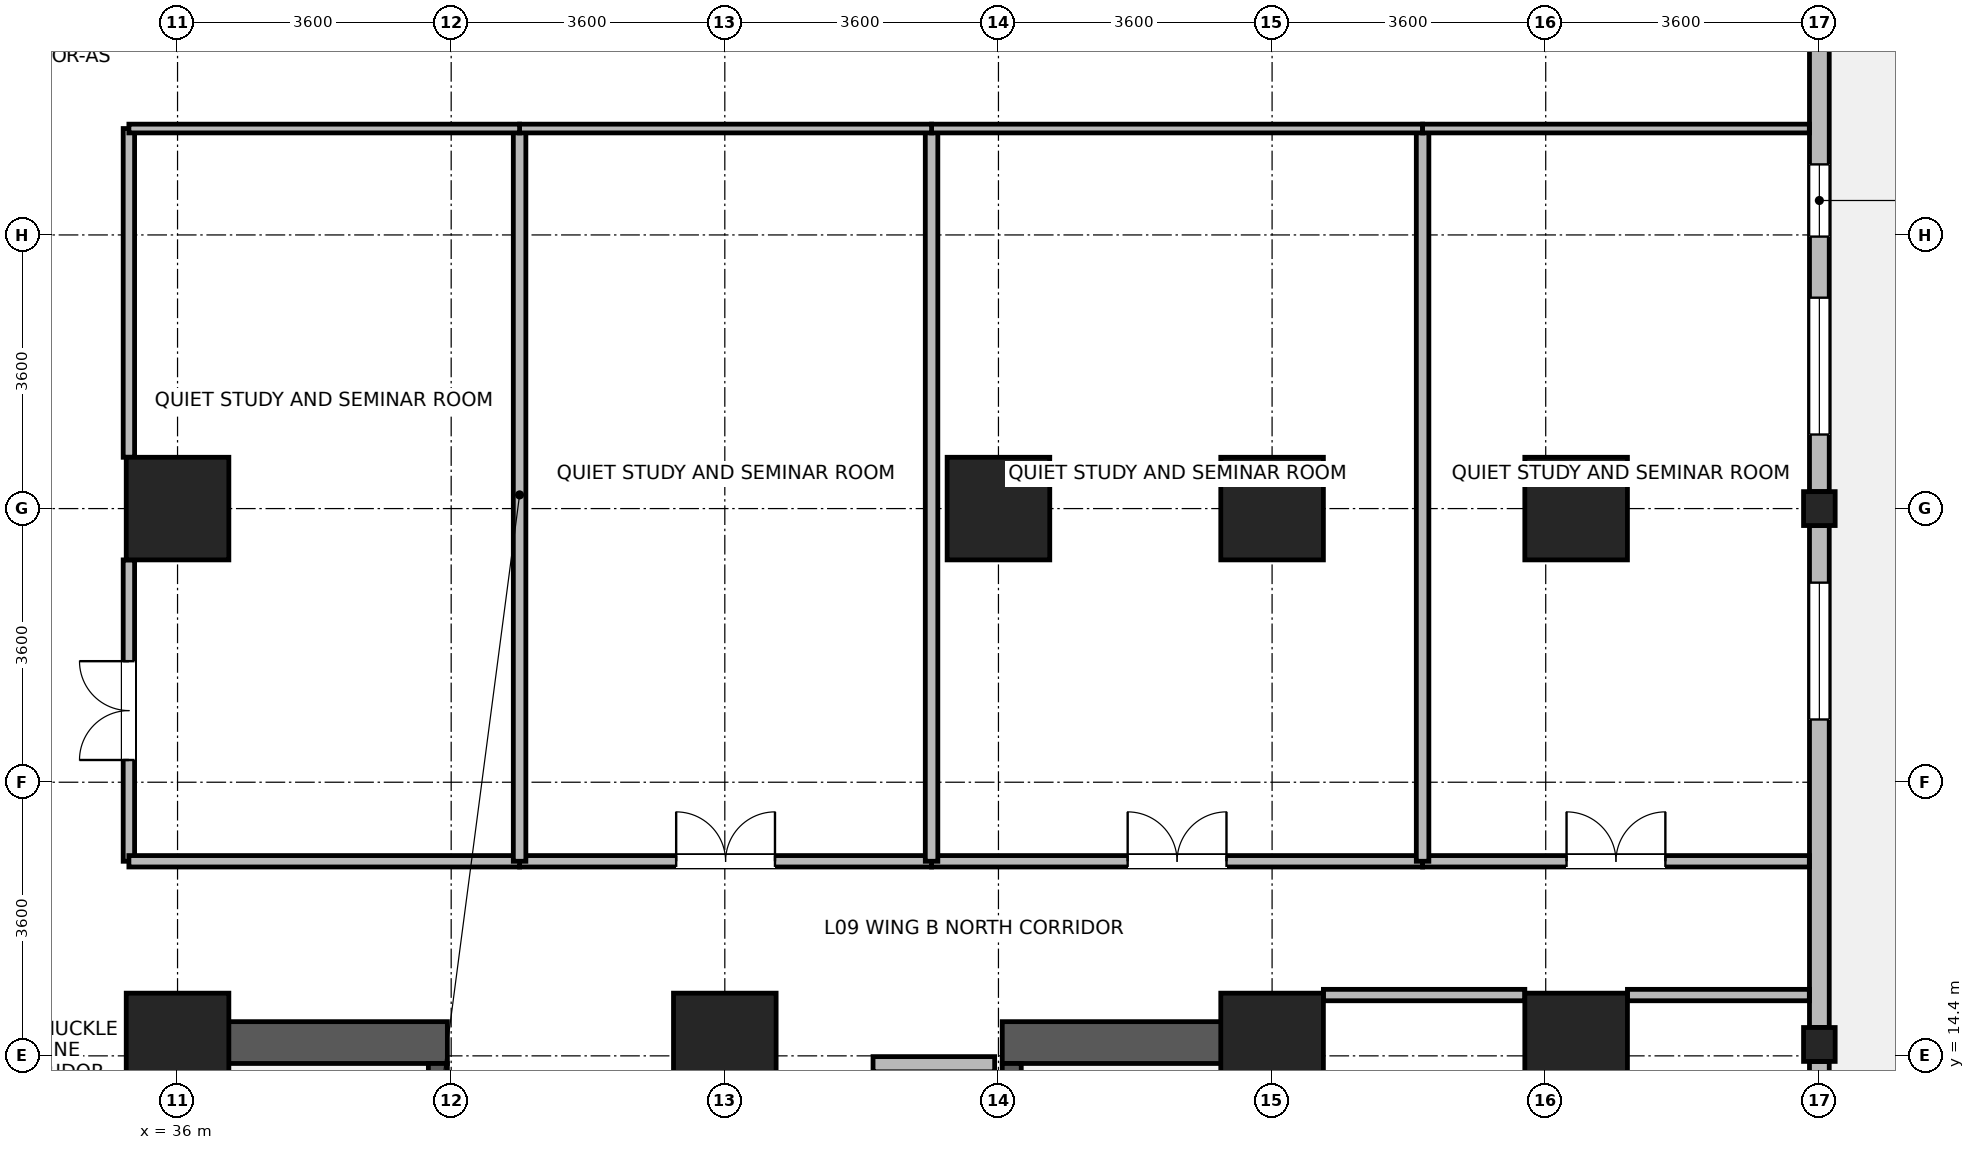
"""IFC4 building model, lengths in metres.
Left out: names, types, materials, properties, quantities, classifications, styles, units other than length and angle.
Written with IfcOpenShell. Run it as: python <this file> out.ifc"""

import sys

from ifc_helpers import new_model, si_unit, direction, frame, frame_2d, origin, origin_2d, place, context, subcontext, project, spatial, rectangle, i_section, extrude, source, transform, mapped, element, fill, save


model = new_model("IFC4")
c1 = context("Model", 3, precision=1e-05, world=origin(), true_north=direction((0.0, 1.0)))
c2 = subcontext(c1, "Body", "Model", "MODEL_VIEW")
j1 = project(units=[si_unit("LENGTHUNIT", "METRE"), si_unit("PLANEANGLEUNIT", "RADIAN")], contexts=[c1])
p1 = place(None, origin())
s1 = spatial("IfcSite", under=j1, at=p1, CompositionType="ELEMENT")
p2 = place(p1, origin())
s2 = spatial("IfcBuilding", under=s1, at=p2, CompositionType="ELEMENT")
p3 = place(p2, frame((0.0, 0.0, 40.1)))
s3 = spatial("IfcBuildingStorey", under=s2, at=p3, CompositionType="ELEMENT", Elevation=40.1)
for number, where, z_axis, x_axis in (
    (1, (36.075, 6.75, 0.0), (0.0, 0.0, 1.0), (0.0, 1.0, 0.0)),
    (2, (50.325, 6.75, 0.0), (0.0, 0.0, 1.0), (0.0, 1.0, 0.0)),
):
    element("IfcWall", number, at=place(p3, frame(where, z_axis=z_axis, x_axis=x_axis)), inside=s3, PredefinedType="SHEAR", context=c2, shape_type="SweptSolid", body=[
        extrude(rectangle(XDim=8.1, YDim=0.55, at=frame_2d((4.05, 0.0))), origin(), (0.0, 0.0, 1.0), 3.45),
    ])
for number, where, z_axis, x_axis in (
    (3, (36.35, 14.575, 0.0), (0.0, 0.0, 1.0), (1.0, 0.0, 0.0)),
    (4, (46.85, 14.575, 0.0), (0.0, 0.0, 1.0), (1.0, 0.0, 0.0)),
):
    element("IfcWall", number, at=place(p3, frame(where, z_axis=z_axis, x_axis=x_axis)), inside=s3, PredefinedType="SHEAR", context=c2, shape_type="SweptSolid", body=[
        extrude(rectangle(XDim=3.2, YDim=0.55, at=frame_2d((1.6, 0.0))), origin(), (0.0, 0.0, 1.0), 3.45),
    ])
p4 = place(p3, frame((39.425, 7.3, 0.0), z_axis=(0.0, 0.0, 1.0), x_axis=(0.0, 1.0, 0.0)))
e5 = element("IfcWall", 5, at=p4, inside=s3, PredefinedType="SHEAR", context=c2, shape_type="SweptSolid", body=[
    extrude(rectangle(XDim=7.0, YDim=0.25, at=frame_2d((3.5, 0.0))), origin(), (0.0, 0.0, 1.0), 3.45),
])
p5 = place(p4, frame((0.15, 0.0, 0.0)))
e6 = element("IfcOpeningElement", 6, at=p5, cuts=e5, PredefinedType="OPENING", context=c2, shape_type="SweptSolid", body=[
    extrude(rectangle(XDim=1.1, YDim=2.08, at=frame_2d((0.55, 1.04))), frame((0.0, 0.135, 0.0), z_axis=(0.0, -1.0, 0.0), x_axis=(1.0, 0.0, 0.0)), (0.0, 0.0, 1.0), 0.27),
])
p6 = place(p3, frame((46.975, 7.3, 0.0), z_axis=(0.0, 0.0, 1.0), x_axis=(0.0, 1.0, 0.0)))
e7 = element("IfcWall", 7, at=p6, inside=s3, PredefinedType="SHEAR", context=c2, shape_type="SweptSolid", body=[
    extrude(rectangle(XDim=7.0, YDim=0.25, at=frame_2d((3.5, 0.0))), origin(), (0.0, 0.0, 1.0), 3.45),
])
p7 = place(p6, frame((0.15, 0.0, 0.0)))
e8 = element("IfcOpeningElement", 8, at=p7, cuts=e7, PredefinedType="OPENING", context=c2, shape_type="SweptSolid", body=[
    extrude(rectangle(XDim=1.1, YDim=2.08, at=frame_2d((0.55, 1.04))), frame((0.0, 0.135, 0.0), z_axis=(0.0, -1.0, 0.0), x_axis=(1.0, 0.0, 0.0)), (0.0, 0.0, 1.0), 0.27),
])
m1 = source(origin(), c2, "Body", "SweptSolid", [
    extrude(rectangle(XDim=1.35, YDim=1.35, at=origin_2d()), origin(), (0.0, 0.0, 1.0), 3.7),
])
for number, where, z_axis, x_axis in (
    (9, (36.0, 21.6, 0.0), (0.0, 0.0, 1.0), (1.0, 0.0, 0.0)),
    (10, (46.8, 21.6, 0.0), (0.0, 0.0, 1.0), (1.0, 0.0, 0.0)),
    (11, (36.0, 14.55, 0.0), (0.0, 0.0, 1.0), (1.0, 0.0, 0.0)),
    (12, (43.2, 14.55, 0.0), (0.0, 0.0, 1.0), (1.0, 0.0, 0.0)),
    (13, (50.4, 14.55, 0.0), (0.0, 0.0, 1.0), (1.0, 0.0, 0.0)),
    (14, (50.4, 21.6, 0.0), (0.0, 0.0, 1.0), (1.0, 0.0, 0.0)),
    (15, (54.4, 14.55, 0.0), (0.0, 0.0, 1.0), (1.0, 0.0, 0.0)),
    (16, (54.4, 21.6, 0.0), (0.0, 0.0, 1.0), (1.0, 0.0, 0.0)),
):
    element("IfcColumn", number, at=place(p3, frame(where, z_axis=z_axis, x_axis=x_axis)), inside=s3, PredefinedType="COLUMN", context=c2, shape_type="MappedRepresentation", body=[
        mapped(m1, transform((0.0, 0.0, 0.0), x_axis=(1.0, 0.0, 0.0), y_axis=(0.0, 1.0, 0.0), z_axis=(0.0, 0.0, 1.0), scale=1.0)),
    ])
m2 = source(origin(), c2, "Body", "SweptSolid", [
    extrude(i_section(OverallWidth=0.416, OverallDepth=0.446, WebThickness=0.029, FlangeThickness=0.04, FilletRadius=0.015, at=origin_2d()), origin(), (0.0, 0.0, 1.0), 3.7),
])
for number, where, z_axis, x_axis in (
    (17, (57.6, 14.55, 0.0), (0.0, 0.0, 1.0), (1.0, 0.0, 0.0)),
    (18, (57.6, 21.6, 0.0), (0.0, 0.0, 1.0), (1.0, 0.0, 0.0)),
):
    element("IfcColumn", number, at=place(p3, frame(where, z_axis=z_axis, x_axis=x_axis)), inside=s3, PredefinedType="COLUMN", context=c2, shape_type="MappedRepresentation", body=[
        mapped(m2, transform((0.0, 0.0, 0.0), x_axis=(1.0, 0.0, 0.0), y_axis=(0.0, 1.0, 0.0), z_axis=(0.0, 0.0, 1.0), scale=1.0)),
    ])
p8 = place(p3, frame((57.6, 14.326, 0.0), z_axis=(0.0, 0.0, 1.0), x_axis=(0.0, -1.0, 0.0)))
e19 = element("IfcWall", 19, at=p8, inside=s3, PredefinedType="STANDARD", context=c2, shape_type="SweptSolid", body=[
    extrude(rectangle(XDim=7.052, YDim=0.26, at=frame_2d((3.526, 0.0))), origin(), (0.0, 0.0, 1.0), 2.93),
])
p9 = place(p8, frame((0.863, 0.0, 0.85)))
e20 = element("IfcOpeningElement", 20, at=p9, cuts=e19, PredefinedType="OPENING", context=c2, shape_type="SweptSolid", body=[
    extrude(rectangle(XDim=1.8, YDim=1.85, at=frame_2d((0.9, 0.925))), frame((0.0, 0.14, 0.0), z_axis=(0.0, -1.0, 0.0), x_axis=(1.0, 0.0, 0.0)), (0.0, 0.0, 1.0), 0.28),
])
p10 = place(p8, frame((4.389, 0.0, 0.85)))
e21 = element("IfcOpeningElement", 21, at=p10, cuts=e19, PredefinedType="OPENING", context=c2, shape_type="SweptSolid", body=[
    extrude(rectangle(XDim=1.8, YDim=1.85, at=frame_2d((0.9, 0.925))), frame((0.0, 0.14, 0.0), z_axis=(0.0, -1.0, 0.0), x_axis=(1.0, 0.0, 0.0)), (0.0, 0.0, 1.0), 0.28),
])
p11 = place(p3, frame((57.6, 21.376, 0.0), z_axis=(0.0, 0.0, 1.0), x_axis=(0.0, -1.0, 0.0)))
e22 = element("IfcWall", 22, at=p11, inside=s3, PredefinedType="STANDARD", context=c2, shape_type="SweptSolid", body=[
    extrude(rectangle(XDim=6.602, YDim=0.26, at=frame_2d((3.301, 0.0))), origin(), (0.0, 0.0, 1.0), 2.93),
])
p12 = place(p11, frame((0.75, 0.0, 0.85)))
e23 = element("IfcOpeningElement", 23, at=p12, cuts=e22, PredefinedType="OPENING", context=c2, shape_type="SweptSolid", body=[
    extrude(rectangle(XDim=1.8, YDim=1.85, at=frame_2d((0.9, 0.925))), frame((0.0, 0.14, 0.0), z_axis=(0.0, -1.0, 0.0), x_axis=(1.0, 0.0, 0.0)), (0.0, 0.0, 1.0), 0.28),
])
p13 = place(p3, frame((57.6, 28.426, 0.0), z_axis=(0.0, 0.0, 1.0), x_axis=(0.0, -1.0, 0.0)))
e24 = element("IfcWall", 24, at=p13, inside=s3, PredefinedType="STANDARD", context=c2, shape_type="SweptSolid", body=[
    extrude(rectangle(XDim=6.602, YDim=0.26, at=frame_2d((3.301, 0.0))), origin(), (0.0, 0.0, 1.0), 2.93),
])
p14 = place(p13, frame((4.052, 0.0, 0.85)))
e25 = element("IfcOpeningElement", 25, at=p14, cuts=e24, PredefinedType="OPENING", context=c2, shape_type="SweptSolid", body=[
    extrude(rectangle(XDim=1.8, YDim=1.85, at=frame_2d((0.9, 0.925))), frame((0.0, 0.14, 0.0), z_axis=(0.0, -1.0, 0.0), x_axis=(1.0, 0.0, 0.0)), (0.0, 0.0, 1.0), 0.28),
])
p15 = place(p13, frame((2.298, 0.0, 0.85)))
e26 = element("IfcOpeningElement", 26, at=p15, cuts=e24, PredefinedType="OPENING", context=c2, shape_type="SweptSolid", body=[
    extrude(rectangle(XDim=0.95, YDim=1.75, at=frame_2d((0.475, 0.875))), frame((0.0, 0.14, 0.0), z_axis=(0.0, -1.0, 0.0), x_axis=(1.0, 0.0, 0.0)), (0.0, 0.0, 1.0), 0.28),
])
p16 = place(p3, frame((45.15, 14.29, 0.0), z_axis=(0.0, 0.0, 1.0), x_axis=(1.0, 0.0, 0.0)))
e27 = element("IfcWall", 27, at=p16, inside=s3, PredefinedType="PARTITIONING", context=c2, shape_type="SweptSolid", body=[
    extrude(rectangle(XDim=1.6, YDim=0.2, at=frame_2d((0.8, 0.0))), origin(), (0.0, 0.0, 1.0), 2.23),
])
p17 = place(p3, frame((35.36, 16.96, 0.0), z_axis=(0.0, 0.0, 1.0), x_axis=(0.0, 1.0, 0.0)))
e28 = element("IfcWall", 28, at=p17, inside=s3, PredefinedType="PARTITIONING", context=c2, shape_type="SweptSolid", body=[
    extrude(rectangle(XDim=3.965, YDim=0.15, at=frame_2d((1.982, 0.0))), origin(), (0.0, 0.0, 1.0), 3.43),
])
p18 = place(p17, frame((1.333, 0.0, 0.0)))
e29 = element("IfcOpeningElement", 29, at=p18, cuts=e28, PredefinedType="OPENING", context=c2, shape_type="SweptSolid", body=[
    extrude(rectangle(XDim=1.3, YDim=2.12, at=frame_2d((0.65, 1.06))), frame((0.0, 0.085, 0.0), z_axis=(0.0, -1.0, 0.0), x_axis=(1.0, 0.0, 0.0)), (0.0, 0.0, 1.0), 0.17),
])
p19 = place(p3, frame((35.36, 22.275, 0.0), z_axis=(0.0, 0.0, 1.0), x_axis=(0.0, 1.0, 0.0)))
e30 = element("IfcWall", 30, at=p19, inside=s3, PredefinedType="PARTITIONING", context=c2, shape_type="SweptSolid", body=[
    extrude(rectangle(XDim=4.325, YDim=0.15, at=frame_2d((2.163, 0.0))), origin(), (0.0, 0.0, 1.0), 3.43),
])
p20 = place(p3, frame((51.075, 15.2, 0.0), z_axis=(0.0, 0.0, 1.0), x_axis=(1.0, 0.0, 0.0)))
e31 = element("IfcWall", 31, at=p20, inside=s3, PredefinedType="PARTITIONING", context=c2, shape_type="SweptSolid", body=[
    extrude(rectangle(XDim=2.65, YDim=0.15, at=frame_2d((1.325, 0.0))), origin(), (0.0, 0.0, 1.0), 3.43),
])
p21 = place(p3, frame((55.075, 15.2, 0.0), z_axis=(0.0, 0.0, 1.0), x_axis=(1.0, 0.0, 0.0)))
e32 = element("IfcWall", 32, at=p21, inside=s3, PredefinedType="PARTITIONING", context=c2, shape_type="SweptSolid", body=[
    extrude(rectangle(XDim=2.393, YDim=0.15, at=frame_2d((1.197, 0.0))), origin(), (0.0, 0.0, 1.0), 3.43),
])
p22 = place(p3, frame((45.92, 16.96, 0.0), z_axis=(0.0, 0.0, 1.0), x_axis=(1.0, 0.0, 0.0)))
e33 = element("IfcWall", 33, at=p22, inside=s3, PredefinedType="PARTITIONING", context=c2, shape_type="SweptSolid", body=[
    extrude(rectangle(XDim=6.46, YDim=0.15, at=frame_2d((3.23, 0.0))), origin(), (0.0, 0.0, 1.0), 3.43),
])
p23 = place(p22, frame((2.58, 0.0, 0.0)))
e34 = element("IfcOpeningElement", 34, at=p23, cuts=e33, PredefinedType="OPENING", context=c2, shape_type="SweptSolid", body=[
    extrude(rectangle(XDim=1.3, YDim=2.12, at=frame_2d((0.65, 1.06))), frame((0.0, 0.085, 0.0), z_axis=(0.0, -1.0, 0.0), x_axis=(1.0, 0.0, 0.0)), (0.0, 0.0, 1.0), 0.17),
])
p24 = place(p3, frame((40.5, 16.96, 0.0), z_axis=(0.0, 0.0, 1.0), x_axis=(1.0, 0.0, 0.0)))
e35 = element("IfcWall", 35, at=p24, inside=s3, PredefinedType="PARTITIONING", context=c2, shape_type="SweptSolid", body=[
    extrude(rectangle(XDim=5.42, YDim=0.15, at=frame_2d((2.71, 0.0))), origin(), (0.0, 0.0, 1.0), 3.43),
])
p25 = place(p24, frame((2.06, 0.0, 0.0)))
e36 = element("IfcOpeningElement", 36, at=p25, cuts=e35, PredefinedType="OPENING", context=c2, shape_type="SweptSolid", body=[
    extrude(rectangle(XDim=1.3, YDim=2.12, at=frame_2d((0.65, 1.06))), frame((0.0, 0.085, 0.0), z_axis=(0.0, -1.0, 0.0), x_axis=(1.0, 0.0, 0.0)), (0.0, 0.0, 1.0), 0.17),
])
p26 = place(p3, frame((52.38, 16.96, 0.0), z_axis=(0.0, 0.0, 1.0), x_axis=(1.0, 0.0, 0.0)))
e37 = element("IfcWall", 37, at=p26, inside=s3, PredefinedType="PARTITIONING", context=c2, shape_type="SweptSolid", body=[
    extrude(rectangle(XDim=5.088, YDim=0.15, at=frame_2d((2.544, 0.0))), origin(), (0.0, 0.0, 1.0), 3.43),
])
p27 = place(p26, frame((1.894, 0.0, 0.0)))
e38 = element("IfcOpeningElement", 38, at=p27, cuts=e37, PredefinedType="OPENING", context=c2, shape_type="SweptSolid", body=[
    extrude(rectangle(XDim=1.3, YDim=2.12, at=frame_2d((0.65, 1.06))), frame((0.0, 0.085, 0.0), z_axis=(0.0, -1.0, 0.0), x_axis=(1.0, 0.0, 0.0)), (0.0, 0.0, 1.0), 0.17),
])
p28 = place(p3, frame((35.36, 16.96, 0.0), z_axis=(0.0, 0.0, 1.0), x_axis=(1.0, 0.0, 0.0)))
e39 = element("IfcWall", 39, at=p28, inside=s3, PredefinedType="PARTITIONING", context=c2, shape_type="SweptSolid", body=[
    extrude(rectangle(XDim=5.14, YDim=0.15, at=frame_2d((2.57, 0.0))), origin(), (0.0, 0.0, 1.0), 3.43),
])
for number, where, z_axis, x_axis in (
    (40, (40.5, 16.96, 0.0), (0.0, 0.0, 1.0), (0.0, 1.0, 0.0)),
    (41, (45.92, 16.96, 0.0), (0.0, 0.0, 1.0), (0.0, 1.0, 0.0)),
    (42, (52.38, 16.96, 0.0), (0.0, 0.0, 1.0), (0.0, 1.0, 0.0)),
):
    element("IfcWall", number, at=place(p3, frame(where, z_axis=z_axis, x_axis=x_axis)), inside=s3, PredefinedType="PARTITIONING", context=c2, shape_type="SweptSolid", body=[
        extrude(rectangle(XDim=9.64, YDim=0.165, at=frame_2d((4.82, 0.0))), origin(), (0.0, 0.0, 1.0), 3.43),
    ])
p29 = place(p3, frame((45.92, 26.6, 0.0), z_axis=(0.0, 0.0, 1.0), x_axis=(1.0, 0.0, 0.0)))
e43 = element("IfcWall", 43, at=p29, inside=s3, PredefinedType="PARTITIONING", context=c2, shape_type="SweptSolid", body=[
    extrude(rectangle(XDim=6.46, YDim=0.115, at=frame_2d((3.23, 0.0))), origin(), (0.0, 0.0, 1.0), 3.43),
])
p30 = place(p3, frame((40.5, 26.6, 0.0), z_axis=(0.0, 0.0, 1.0), x_axis=(1.0, 0.0, 0.0)))
e44 = element("IfcWall", 44, at=p30, inside=s3, PredefinedType="PARTITIONING", context=c2, shape_type="SweptSolid", body=[
    extrude(rectangle(XDim=5.42, YDim=0.115, at=frame_2d((2.71, 0.0))), origin(), (0.0, 0.0, 1.0), 3.43),
])
p31 = place(p3, frame((52.38, 26.6, 0.0), z_axis=(0.0, 0.0, 1.0), x_axis=(1.0, 0.0, 0.0)))
e45 = element("IfcWall", 45, at=p31, inside=s3, PredefinedType="PARTITIONING", context=c2, shape_type="SweptSolid", body=[
    extrude(rectangle(XDim=5.088, YDim=0.115, at=frame_2d((2.544, 0.0))), origin(), (0.0, 0.0, 1.0), 3.43),
])
p32 = place(p3, frame((35.36, 26.6, 0.0), z_axis=(0.0, 0.0, 1.0), x_axis=(1.0, 0.0, 0.0)))
e46 = element("IfcWall", 46, at=p32, inside=s3, PredefinedType="PARTITIONING", context=c2, shape_type="SweptSolid", body=[
    extrude(rectangle(XDim=5.14, YDim=0.115, at=frame_2d((2.57, 0.0))), origin(), (0.0, 0.0, 1.0), 3.43),
])
p33 = place(p12, origin())
e47 = element("IfcWindow", 47, at=p33, inside=s3, PartitioningType="SINGLE_PANEL", PredefinedType="WINDOW", context=c2, shape_type="SweptSolid", body=[
    extrude(rectangle(XDim=1.8, YDim=1.85, at=frame_2d((0.9, 0.925))), frame((0.0, 0.03, 0.0), z_axis=(0.0, -1.0, 0.0), x_axis=(1.0, 0.0, 0.0)), (0.0, 0.0, 1.0), 0.06),
])
fill(e23, e47)
p34 = place(p14, origin())
e48 = element("IfcWindow", 48, at=p34, inside=s3, PartitioningType="SINGLE_PANEL", PredefinedType="WINDOW", context=c2, shape_type="SweptSolid", body=[
    extrude(rectangle(XDim=1.8, YDim=1.85, at=frame_2d((0.9, 0.925))), frame((0.0, 0.03, 0.0), z_axis=(0.0, -1.0, 0.0), x_axis=(1.0, 0.0, 0.0)), (0.0, 0.0, 1.0), 0.06),
])
fill(e25, e48)
p35 = place(p15, origin())
e49 = element("IfcWindow", 49, at=p35, inside=s3, PartitioningType="SINGLE_PANEL", PredefinedType="WINDOW", context=c2, shape_type="SweptSolid", body=[
    extrude(rectangle(XDim=0.95, YDim=1.75, at=frame_2d((0.475, 0.875))), frame((0.0, 0.03, 0.0), z_axis=(0.0, -1.0, 0.0), x_axis=(1.0, 0.0, 0.0)), (0.0, 0.0, 1.0), 0.06),
])
fill(e26, e49)
p36 = place(p18, origin())
e50 = element("IfcDoor", 50, at=p36, inside=s3, OperationType="DOUBLE_DOOR_SINGLE_SWING", PredefinedType="DOOR", context=c2, shape_type="SweptSolid", body=[
    extrude(rectangle(XDim=1.3, YDim=2.12, at=frame_2d((0.65, 1.06))), frame((0.0, 0.025, 0.0), z_axis=(0.0, -1.0, 0.0), x_axis=(1.0, 0.0, 0.0)), (0.0, 0.0, 1.0), 0.05),
])
fill(e29, e50)
p37 = place(p23, origin())
e51 = element("IfcDoor", 51, at=p37, inside=s3, OperationType="DOUBLE_DOOR_SINGLE_SWING", PredefinedType="DOOR", context=c2, shape_type="SweptSolid", body=[
    extrude(rectangle(XDim=1.3, YDim=2.12, at=frame_2d((0.65, 1.06))), frame((0.0, 0.025, 0.0), z_axis=(0.0, -1.0, 0.0), x_axis=(1.0, 0.0, 0.0)), (0.0, 0.0, 1.0), 0.05),
])
fill(e34, e51)
p38 = place(p25, origin())
e52 = element("IfcDoor", 52, at=p38, inside=s3, OperationType="DOUBLE_DOOR_SINGLE_SWING", PredefinedType="DOOR", context=c2, shape_type="SweptSolid", body=[
    extrude(rectangle(XDim=1.3, YDim=2.12, at=frame_2d((0.65, 1.06))), frame((0.0, 0.025, 0.0), z_axis=(0.0, -1.0, 0.0), x_axis=(1.0, 0.0, 0.0)), (0.0, 0.0, 1.0), 0.05),
])
fill(e36, e52)
p39 = place(p27, origin())
e53 = element("IfcDoor", 53, at=p39, inside=s3, OperationType="DOUBLE_DOOR_SINGLE_SWING", PredefinedType="DOOR", context=c2, shape_type="SweptSolid", body=[
    extrude(rectangle(XDim=1.3, YDim=2.12, at=frame_2d((0.65, 1.06))), frame((0.0, 0.025, 0.0), z_axis=(0.0, -1.0, 0.0), x_axis=(1.0, 0.0, 0.0)), (0.0, 0.0, 1.0), 0.05),
])
fill(e38, e53)
save(model, sys.argv[1])
